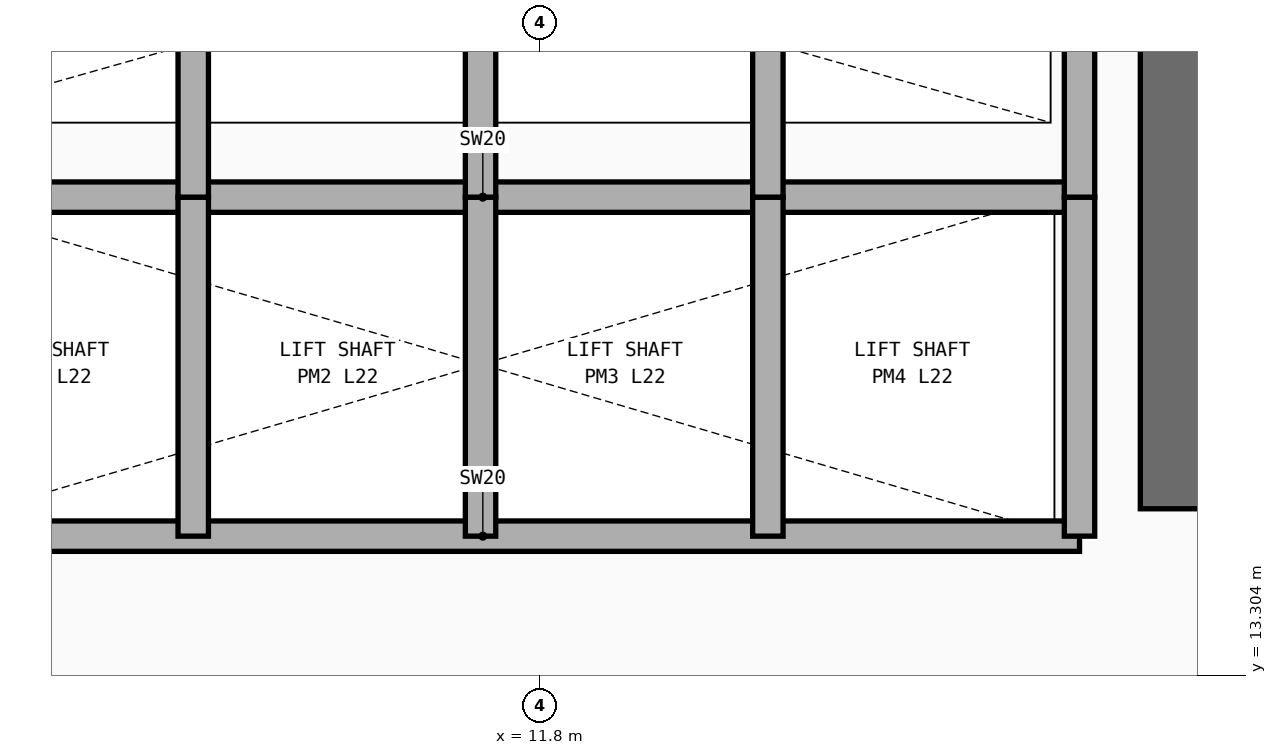
"""IFC4 building model, lengths in metres.
Left out: names, types, materials, properties, quantities, classifications, styles, units other than length and angle.
Written with IfcOpenShell. Run it as: python <this file> out.ifc"""

import sys

from ifc_helpers import new_model, si_unit, direction, frame, frame_2d, origin, place, context, subcontext, project, spatial, rectangle, extrude, element, save


model = new_model("IFC4")
c1 = context("Model", 3, precision=1e-05, world=origin(), true_north=direction((0.0, 1.0)))
c2 = subcontext(c1, "Body", "Model", "MODEL_VIEW")
j1 = project(units=[si_unit("LENGTHUNIT", "METRE"), si_unit("PLANEANGLEUNIT", "RADIAN")], contexts=[c1])
p1 = place(None, origin())
s1 = spatial("IfcSite", under=j1, at=p1, CompositionType="ELEMENT")
p2 = place(p1, origin())
s2 = spatial("IfcBuilding", under=s1, at=p2, CompositionType="ELEMENT")
p3 = place(p2, frame((0.0, 0.0, 87.9)))
s3 = spatial("IfcBuildingStorey", under=s2, at=p3, CompositionType="ELEMENT", Elevation=87.9)
p4 = place(p3, frame((16.075, 14.4, 0.0), z_axis=(0.0, 0.0, 1.0), x_axis=(0.0, 1.0, 0.0)))
e1 = element("IfcWall", 1, at=p4, inside=s3, PredefinedType="SHEAR", context=c2, shape_type="SweptSolid", body=[
    extrude(rectangle(XDim=9.1, YDim=0.65, at=frame_2d((4.55, 0.0))), origin(), (0.0, 0.0, 1.0), 3.54),
])
for number, where, z_axis, x_axis in (
    (2, (7.5, 14.22, 0.0), (0.0, 0.0, 1.0), (1.0, 0.0, 0.0)),
    (3, (7.5, 16.45, 0.0), (0.0, 0.0, 1.0), (1.0, 0.0, 0.0)),
):
    element("IfcWall", number, at=place(p3, frame(where, z_axis=z_axis, x_axis=x_axis)), inside=s3, PredefinedType="PARTITIONING", context=c2, shape_type="SweptSolid", body=[
        extrude(rectangle(XDim=7.85, YDim=0.2, at=frame_2d((3.925, 0.0))), origin(), (0.0, 0.0, 1.0), 3.54),
    ])
for number, where, z_axis, x_axis in (
    (4, (15.35, 14.22, 0.0), (0.0, 0.0, 1.0), (0.0, 1.0, 0.0)),
    (5, (9.52, 14.22, 0.0), (0.0, 0.0, 1.0), (0.0, 1.0, 0.0)),
    (6, (11.41, 14.22, 0.0), (0.0, 0.0, 1.0), (0.0, 1.0, 0.0)),
    (7, (13.3, 14.22, 0.0), (0.0, 0.0, 1.0), (0.0, 1.0, 0.0)),
):
    element("IfcWall", number, at=place(p3, frame(where, z_axis=z_axis, x_axis=x_axis)), inside=s3, PredefinedType="PARTITIONING", context=c2, shape_type="SweptSolid", body=[
        extrude(rectangle(XDim=2.23, YDim=0.2, at=frame_2d((1.115, 0.0))), origin(), (0.0, 0.0, 1.0), 3.54),
    ])
for number, where, z_axis, x_axis in (
    (8, (15.35, 16.45, 0.0), (0.0, 0.0, 1.0), (0.0, 1.0, 0.0)),
    (9, (9.52, 16.45, 0.0), (0.0, 0.0, 1.0), (0.0, 1.0, 0.0)),
    (10, (11.41, 16.45, 0.0), (0.0, 0.0, 1.0), (0.0, 1.0, 0.0)),
    (11, (13.3, 16.45, 0.0), (0.0, 0.0, 1.0), (0.0, 1.0, 0.0)),
):
    element("IfcWall", number, at=place(p3, frame(where, z_axis=z_axis, x_axis=x_axis)), inside=s3, PredefinedType="PARTITIONING", context=c2, shape_type="SweptSolid", body=[
        extrude(rectangle(XDim=2.67, YDim=0.2, at=frame_2d((1.335, 0.0))), origin(), (0.0, 0.0, 1.0), 3.54),
    ])
save(model, sys.argv[1])
